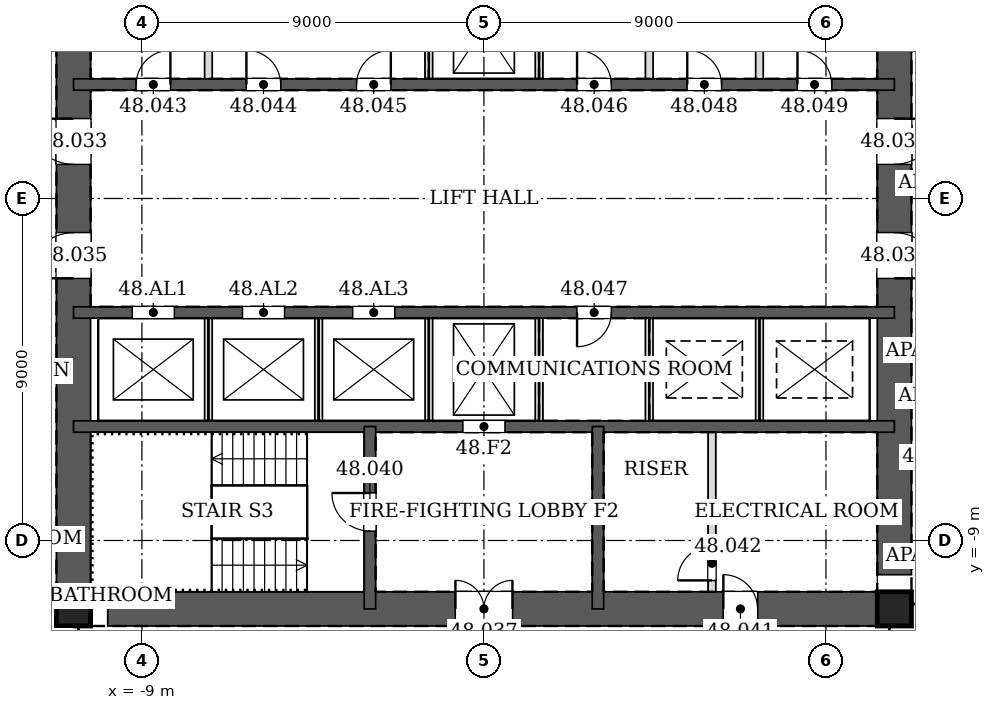
"""IFC4 building model, lengths in metres.
Left out: names, types, materials, properties, quantities, classifications, styles, units other than length and angle.
Written with IfcOpenShell. Run it as: python <this file> out.ifc"""

import sys

from ifc_helpers import new_model, si_unit, direction, frame, frame_2d, origin, origin_2d, place, context, subcontext, project, spatial, rectangle, hollow_rectangle, extrude, element, fill, save


model = new_model("IFC4")
c1 = context("Model", 3, precision=1e-05, world=origin(), true_north=direction((0.0, 1.0)))
c2 = subcontext(c1, "Body", "Model", "MODEL_VIEW")
j1 = project(units=[si_unit("LENGTHUNIT", "METRE"), si_unit("PLANEANGLEUNIT", "RADIAN")], contexts=[c1])
p1 = place(None, origin())
s1 = spatial("IfcSite", under=j1, at=p1, CompositionType="ELEMENT")
p2 = place(p1, origin())
s2 = spatial("IfcBuilding", under=s1, at=p2, CompositionType="ELEMENT")
p3 = place(p2, frame((0.0, 0.0, 210.8)))
s3 = spatial("IfcBuildingStorey", under=s2, at=p3, CompositionType="ELEMENT", Elevation=210.8)
for number, where, z_axis, x_axis in (
    (1, (-10.8, -10.8, 0.0), (0.0, 0.0, 1.0), (1.0, 0.0, 0.0)),
    (2, (10.8, -10.8, 0.0), (0.0, 0.0, 1.0), (1.0, 0.0, 0.0)),
):
    element("IfcColumn", number, at=place(p3, frame(where, z_axis=z_axis, x_axis=x_axis)), inside=s3, PredefinedType="COLUMN", context=c2, shape_type="SweptSolid", body=[
        extrude(hollow_rectangle(XDim=0.9, YDim=0.9, WallThickness=0.05, at=origin_2d()), origin(), (0.0, 0.0, 1.0), 3.4),
    ])
p4 = place(p3, frame((-10.8, -10.8, 0.0), z_axis=(0.0, 0.0, 1.0), x_axis=(1.0, 0.0, 0.0)))
e3 = element("IfcWall", 3, at=p4, inside=s3, PredefinedType="SOLIDWALL", context=c2, shape_type="SweptSolid", body=[
    extrude(rectangle(XDim=21.6, YDim=0.9, at=frame_2d((10.8, 0.0))), origin(), (0.0, 0.0, 1.0), 3.4),
])
p5 = place(p4, frame((10.05, 0.0, 0.0)))
e4 = element("IfcOpeningElement", 4, at=p5, cuts=e3, PredefinedType="OPENING", context=c2, shape_type="SweptSolid", body=[
    extrude(rectangle(XDim=1.5, YDim=2.1, at=frame_2d((0.75, 1.05))), frame((0.0, 0.46, 0.0), z_axis=(0.0, -1.0, 0.0), x_axis=(1.0, 0.0, 0.0)), (0.0, 0.0, 1.0), 0.92),
])
p6 = place(p4, frame((17.1, 0.0, 0.0)))
e5 = element("IfcOpeningElement", 5, at=p6, cuts=e3, PredefinedType="OPENING", context=c2, shape_type="SweptSolid", body=[
    extrude(rectangle(XDim=0.9, YDim=2.1, at=frame_2d((0.45, 1.05))), frame((0.0, 0.46, 0.0), z_axis=(0.0, -1.0, 0.0), x_axis=(1.0, 0.0, 0.0)), (0.0, 0.0, 1.0), 0.92),
])
p7 = place(p3, frame((10.8, -10.8, 0.0), z_axis=(0.0, 0.0, 1.0), x_axis=(0.0, 1.0, 0.0)))
e6 = element("IfcWall", 6, at=p7, inside=s3, PredefinedType="SOLIDWALL", context=c2, shape_type="SweptSolid", body=[
    extrude(rectangle(XDim=21.6, YDim=0.9, at=frame_2d((10.8, 0.0))), origin(), (0.0, 0.0, 1.0), 3.4),
])
p8 = place(p7, frame((11.7, 0.0, 0.0)))
e7 = element("IfcOpeningElement", 7, at=p8, cuts=e6, PredefinedType="OPENING", context=c2, shape_type="SweptSolid", body=[
    extrude(rectangle(XDim=1.2, YDim=2.1, at=frame_2d((0.6, 1.05))), frame((0.0, 0.46, 0.0), z_axis=(0.0, -1.0, 0.0), x_axis=(1.0, 0.0, 0.0)), (0.0, 0.0, 1.0), 0.92),
])
p9 = place(p7, frame((8.7, 0.0, 0.0)))
e8 = element("IfcOpeningElement", 8, at=p9, cuts=e6, PredefinedType="OPENING", context=c2, shape_type="SweptSolid", body=[
    extrude(rectangle(XDim=1.2, YDim=2.1, at=frame_2d((0.6, 1.05))), frame((0.0, 0.46, 0.0), z_axis=(0.0, -1.0, 0.0), x_axis=(1.0, 0.0, 0.0)), (0.0, 0.0, 1.0), 0.92),
])
p10 = place(p3, frame((-10.8, 10.8, 0.0), z_axis=(0.0, 0.0, 1.0), x_axis=(0.0, -1.0, 0.0)))
e9 = element("IfcWall", 9, at=p10, inside=s3, PredefinedType="SOLIDWALL", context=c2, shape_type="SweptSolid", body=[
    extrude(rectangle(XDim=21.6, YDim=0.9, at=frame_2d((10.8, 0.0))), origin(), (0.0, 0.0, 1.0), 3.4),
])
p11 = place(p10, frame((8.7, 0.0, 0.0)))
e10 = element("IfcOpeningElement", 10, at=p11, cuts=e9, PredefinedType="OPENING", context=c2, shape_type="SweptSolid", body=[
    extrude(rectangle(XDim=1.2, YDim=2.1, at=frame_2d((0.6, 1.05))), frame((0.0, 0.46, 0.0), z_axis=(0.0, -1.0, 0.0), x_axis=(1.0, 0.0, 0.0)), (0.0, 0.0, 1.0), 0.92),
])
p12 = place(p10, frame((11.7, 0.0, 0.0)))
e11 = element("IfcOpeningElement", 11, at=p12, cuts=e9, PredefinedType="OPENING", context=c2, shape_type="SweptSolid", body=[
    extrude(rectangle(XDim=1.2, YDim=2.1, at=frame_2d((0.6, 1.05))), frame((0.0, 0.46, 0.0), z_axis=(0.0, -1.0, 0.0), x_axis=(1.0, 0.0, 0.0)), (0.0, 0.0, 1.0), 0.92),
])
p13 = place(p3, frame((-10.8, 3.0, 0.0), z_axis=(0.0, 0.0, 1.0), x_axis=(1.0, 0.0, 0.0)))
e12 = element("IfcWall", 12, at=p13, inside=s3, PredefinedType="SOLIDWALL", context=c2, shape_type="SweptSolid", body=[
    extrude(rectangle(XDim=21.6, YDim=0.3, at=frame_2d((10.8, 0.0))), origin(), (0.0, 0.0, 1.0), 3.4),
])
p14 = place(p13, frame((1.65, 0.0, 0.0)))
e13 = element("IfcOpeningElement", 13, at=p14, cuts=e12, PredefinedType="OPENING", context=c2, shape_type="SweptSolid", body=[
    extrude(rectangle(XDim=0.9, YDim=2.1, at=frame_2d((0.45, 1.05))), frame((0.0, 0.16, 0.0), z_axis=(0.0, -1.0, 0.0), x_axis=(1.0, 0.0, 0.0)), (0.0, 0.0, 1.0), 0.32),
])
p15 = place(p13, frame((4.55, 0.0, 0.0)))
e14 = element("IfcOpeningElement", 14, at=p15, cuts=e12, PredefinedType="OPENING", context=c2, shape_type="SweptSolid", body=[
    extrude(rectangle(XDim=0.9, YDim=2.1, at=frame_2d((0.45, 1.05))), frame((0.0, 0.16, 0.0), z_axis=(0.0, -1.0, 0.0), x_axis=(1.0, 0.0, 0.0)), (0.0, 0.0, 1.0), 0.32),
])
p16 = place(p13, frame((7.45, 0.0, 0.0)))
e15 = element("IfcOpeningElement", 15, at=p16, cuts=e12, PredefinedType="OPENING", context=c2, shape_type="SweptSolid", body=[
    extrude(rectangle(XDim=0.9, YDim=2.1, at=frame_2d((0.45, 1.05))), frame((0.0, 0.16, 0.0), z_axis=(0.0, -1.0, 0.0), x_axis=(1.0, 0.0, 0.0)), (0.0, 0.0, 1.0), 0.32),
])
p17 = place(p13, frame((13.25, 0.0, 0.0)))
e16 = element("IfcOpeningElement", 16, at=p17, cuts=e12, PredefinedType="OPENING", context=c2, shape_type="SweptSolid", body=[
    extrude(rectangle(XDim=0.9, YDim=2.1, at=frame_2d((0.45, 1.05))), frame((0.0, 0.16, 0.0), z_axis=(0.0, -1.0, 0.0), x_axis=(1.0, 0.0, 0.0)), (0.0, 0.0, 1.0), 0.32),
])
p18 = place(p13, frame((16.15, 0.0, 0.0)))
e17 = element("IfcOpeningElement", 17, at=p18, cuts=e12, PredefinedType="OPENING", context=c2, shape_type="SweptSolid", body=[
    extrude(rectangle(XDim=0.9, YDim=2.1, at=frame_2d((0.45, 1.05))), frame((0.0, 0.16, 0.0), z_axis=(0.0, -1.0, 0.0), x_axis=(1.0, 0.0, 0.0)), (0.0, 0.0, 1.0), 0.32),
])
p19 = place(p13, frame((19.05, 0.0, 0.0)))
e18 = element("IfcOpeningElement", 18, at=p19, cuts=e12, PredefinedType="OPENING", context=c2, shape_type="SweptSolid", body=[
    extrude(rectangle(XDim=0.9, YDim=2.1, at=frame_2d((0.45, 1.05))), frame((0.0, 0.16, 0.0), z_axis=(0.0, -1.0, 0.0), x_axis=(1.0, 0.0, 0.0)), (0.0, 0.0, 1.0), 0.32),
])
p20 = place(p3, frame((-10.8, -3.0, 0.0), z_axis=(0.0, 0.0, 1.0), x_axis=(1.0, 0.0, 0.0)))
e19 = element("IfcWall", 19, at=p20, inside=s3, PredefinedType="SOLIDWALL", context=c2, shape_type="SweptSolid", body=[
    extrude(rectangle(XDim=21.6, YDim=0.3, at=frame_2d((10.8, 0.0))), origin(), (0.0, 0.0, 1.0), 3.4),
])
p21 = place(p20, frame((13.25, 0.0, 0.0)))
e20 = element("IfcOpeningElement", 20, at=p21, cuts=e19, PredefinedType="OPENING", context=c2, shape_type="SweptSolid", body=[
    extrude(rectangle(XDim=0.9, YDim=2.1, at=frame_2d((0.45, 1.05))), frame((0.0, 0.16, 0.0), z_axis=(0.0, -1.0, 0.0), x_axis=(1.0, 0.0, 0.0)), (0.0, 0.0, 1.0), 0.32),
])
p22 = place(p20, frame((1.55, 0.0, 0.0)))
e21 = element("IfcOpeningElement", 21, at=p22, cuts=e19, PredefinedType="OPENING", context=c2, shape_type="SweptSolid", body=[
    extrude(rectangle(XDim=1.1, YDim=2.1, at=frame_2d((0.55, 1.05))), frame((0.0, 0.16, 0.0), z_axis=(0.0, -1.0, 0.0), x_axis=(1.0, 0.0, 0.0)), (0.0, 0.0, 1.0), 0.32),
])
p23 = place(p20, frame((4.45, 0.0, 0.0)))
e22 = element("IfcOpeningElement", 22, at=p23, cuts=e19, PredefinedType="OPENING", context=c2, shape_type="SweptSolid", body=[
    extrude(rectangle(XDim=1.1, YDim=2.1, at=frame_2d((0.55, 1.05))), frame((0.0, 0.16, 0.0), z_axis=(0.0, -1.0, 0.0), x_axis=(1.0, 0.0, 0.0)), (0.0, 0.0, 1.0), 0.32),
])
p24 = place(p20, frame((7.35, 0.0, 0.0)))
e23 = element("IfcOpeningElement", 23, at=p24, cuts=e19, PredefinedType="OPENING", context=c2, shape_type="SweptSolid", body=[
    extrude(rectangle(XDim=1.1, YDim=2.1, at=frame_2d((0.55, 1.05))), frame((0.0, 0.16, 0.0), z_axis=(0.0, -1.0, 0.0), x_axis=(1.0, 0.0, 0.0)), (0.0, 0.0, 1.0), 0.32),
])
p25 = place(p3, frame((-10.8, -6.0, 0.0), z_axis=(0.0, 0.0, 1.0), x_axis=(1.0, 0.0, 0.0)))
e24 = element("IfcWall", 24, at=p25, inside=s3, PredefinedType="SOLIDWALL", context=c2, shape_type="SweptSolid", body=[
    extrude(rectangle(XDim=21.6, YDim=0.3, at=frame_2d((10.8, 0.0))), origin(), (0.0, 0.0, 1.0), 3.4),
])
p26 = place(p25, frame((10.25, 0.0, 0.0)))
e25 = element("IfcOpeningElement", 25, at=p26, cuts=e24, PredefinedType="OPENING", context=c2, shape_type="SweptSolid", body=[
    extrude(rectangle(XDim=1.1, YDim=2.1, at=frame_2d((0.55, 1.05))), frame((0.0, 0.16, 0.0), z_axis=(0.0, -1.0, 0.0), x_axis=(1.0, 0.0, 0.0)), (0.0, 0.0, 1.0), 0.32),
])
p27 = place(p3, frame((-3.0, -6.0, 0.0), z_axis=(0.0, 0.0, 1.0), x_axis=(0.0, -1.0, 0.0)))
e26 = element("IfcWall", 26, at=p27, inside=s3, PredefinedType="SOLIDWALL", context=c2, shape_type="SweptSolid", body=[
    extrude(rectangle(XDim=4.8, YDim=0.3, at=frame_2d((2.4, 0.0))), origin(), (0.0, 0.0, 1.0), 3.4),
])
p28 = place(p27, frame((1.75, 0.0, 0.0)))
e27 = element("IfcOpeningElement", 27, at=p28, cuts=e26, PredefinedType="OPENING", context=c2, shape_type="SweptSolid", body=[
    extrude(rectangle(XDim=1.0, YDim=2.1, at=frame_2d((0.5, 1.05))), frame((0.0, 0.16, 0.0), z_axis=(0.0, -1.0, 0.0), x_axis=(1.0, 0.0, 0.0)), (0.0, 0.0, 1.0), 0.32),
])
p29 = place(p3, frame((3.0, -6.0, 0.0), z_axis=(0.0, 0.0, 1.0), x_axis=(0.0, -1.0, 0.0)))
e28 = element("IfcWall", 28, at=p29, inside=s3, PredefinedType="SOLIDWALL", context=c2, shape_type="SweptSolid", body=[
    extrude(rectangle(XDim=4.8, YDim=0.3, at=frame_2d((2.4, 0.0))), origin(), (0.0, 0.0, 1.0), 3.4),
])
for number, where, z_axis, x_axis in (
    (29, (-7.25, 3.15, 0.0), (0.0, 0.0, 1.0), (0.0, 1.0, 0.0)),
    (30, (-1.45, 3.15, 0.0), (0.0, 0.0, 1.0), (0.0, 1.0, 0.0)),
    (31, (1.45, 3.15, 0.0), (0.0, 0.0, 1.0), (0.0, 1.0, 0.0)),
    (32, (4.35, 3.15, 0.0), (0.0, 0.0, 1.0), (0.0, 1.0, 0.0)),
    (33, (7.25, 3.15, 0.0), (0.0, 0.0, 1.0), (0.0, 1.0, 0.0)),
):
    element("IfcWall", number, at=place(p3, frame(where, z_axis=z_axis, x_axis=x_axis)), inside=s3, PredefinedType="PARTITIONING", context=c2, shape_type="SweptSolid", body=[
        extrude(rectangle(XDim=2.7, YDim=0.2, at=frame_2d((1.35, 0.0))), origin(), (0.0, 0.0, 1.0), 3.2),
    ])
for number, where, z_axis, x_axis in (
    (34, (-7.25, -5.85, 0.0), (0.0, 0.0, 1.0), (0.0, 1.0, 0.0)),
    (35, (-4.35, -5.85, 0.0), (0.0, 0.0, 1.0), (0.0, 1.0, 0.0)),
    (36, (-1.45, -5.85, 0.0), (0.0, 0.0, 1.0), (0.0, 1.0, 0.0)),
):
    element("IfcWall", number, at=place(p3, frame(where, z_axis=z_axis, x_axis=x_axis)), inside=s3, PredefinedType="PARTITIONING", context=c2, shape_type="SweptSolid", body=[
        extrude(rectangle(XDim=2.7, YDim=0.2, at=frame_2d((1.35, 0.0))), origin(), (0.0, 0.0, 1.0), 3.4),
    ])
for number, where, z_axis, x_axis in (
    (37, (1.45, -5.85, 0.0), (0.0, 0.0, 1.0), (0.0, 1.0, 0.0)),
    (38, (4.35, -5.85, 0.0), (0.0, 0.0, 1.0), (0.0, 1.0, 0.0)),
):
    element("IfcWall", number, at=place(p3, frame(where, z_axis=z_axis, x_axis=x_axis)), inside=s3, PredefinedType="PARTITIONING", context=c2, shape_type="SweptSolid", body=[
        extrude(rectangle(XDim=2.7, YDim=0.2, at=frame_2d((1.35, 0.0))), origin(), (0.0, 0.0, 1.0), 3.2),
    ])
p30 = place(p3, frame((7.25, -5.85, 0.0), z_axis=(0.0, 0.0, 1.0), x_axis=(0.0, 1.0, 0.0)))
e39 = element("IfcWall", 39, at=p30, inside=s3, PredefinedType="PARTITIONING", context=c2, shape_type="SweptSolid", body=[
    extrude(rectangle(XDim=2.7, YDim=0.2, at=frame_2d((1.35, 0.0))), origin(), (0.0, 0.0, 1.0), 3.4),
])
p31 = place(p3, frame((6.0, -10.35, 0.0), z_axis=(0.0, 0.0, 1.0), x_axis=(0.0, 1.0, 0.0)))
e40 = element("IfcWall", 40, at=p31, inside=s3, PredefinedType="PARTITIONING", context=c2, shape_type="SweptSolid", body=[
    extrude(rectangle(XDim=4.2, YDim=0.2, at=frame_2d((2.1, 0.0))), origin(), (0.0, 0.0, 1.0), 3.2),
])
p32 = place(p31, frame((0.3, 0.0, 0.0)))
e41 = element("IfcOpeningElement", 41, at=p32, cuts=e40, PredefinedType="OPENING", context=c2, shape_type="SweptSolid", body=[
    extrude(rectangle(XDim=0.9, YDim=2.1, at=frame_2d((0.45, 1.05))), frame((0.0, 0.11, 0.0), z_axis=(0.0, -1.0, 0.0), x_axis=(1.0, 0.0, 0.0)), (0.0, 0.0, 1.0), 0.22),
])
p33 = place(p8, frame((1.2, 0.0, 0.0), z_axis=(0.0, 0.0, 1.0), x_axis=(-1.0, 0.0, 0.0)))
e42 = element("IfcDoor", 42, at=p33, inside=s3, OperationType="SINGLE_SWING_LEFT", PredefinedType="DOOR", context=c2, shape_type="SweptSolid", body=[
    extrude(rectangle(XDim=1.2, YDim=2.1, at=frame_2d((0.6, 1.05))), frame((0.0, 0.025, 0.0), z_axis=(0.0, -1.0, 0.0), x_axis=(1.0, 0.0, 0.0)), (0.0, 0.0, 1.0), 0.05),
])
fill(e7, e42)
p34 = place(p11, frame((1.2, 0.0, 0.0), z_axis=(0.0, 0.0, 1.0), x_axis=(-1.0, 0.0, 0.0)))
e43 = element("IfcDoor", 43, at=p34, inside=s3, OperationType="SINGLE_SWING_RIGHT", PredefinedType="DOOR", context=c2, shape_type="SweptSolid", body=[
    extrude(rectangle(XDim=1.2, YDim=2.1, at=frame_2d((0.6, 1.05))), frame((0.0, 0.025, 0.0), z_axis=(0.0, -1.0, 0.0), x_axis=(1.0, 0.0, 0.0)), (0.0, 0.0, 1.0), 0.05),
])
fill(e10, e43)
p35 = place(p9, frame((1.2, 0.0, 0.0), z_axis=(0.0, 0.0, 1.0), x_axis=(-1.0, 0.0, 0.0)))
e44 = element("IfcDoor", 44, at=p35, inside=s3, OperationType="SINGLE_SWING_RIGHT", PredefinedType="DOOR", context=c2, shape_type="SweptSolid", body=[
    extrude(rectangle(XDim=1.2, YDim=2.1, at=frame_2d((0.6, 1.05))), frame((0.0, 0.025, 0.0), z_axis=(0.0, -1.0, 0.0), x_axis=(1.0, 0.0, 0.0)), (0.0, 0.0, 1.0), 0.05),
])
fill(e8, e44)
p36 = place(p12, frame((1.2, 0.0, 0.0), z_axis=(0.0, 0.0, 1.0), x_axis=(-1.0, 0.0, 0.0)))
e45 = element("IfcDoor", 45, at=p36, inside=s3, OperationType="SINGLE_SWING_LEFT", PredefinedType="DOOR", context=c2, shape_type="SweptSolid", body=[
    extrude(rectangle(XDim=1.2, YDim=2.1, at=frame_2d((0.6, 1.05))), frame((0.0, 0.025, 0.0), z_axis=(0.0, -1.0, 0.0), x_axis=(1.0, 0.0, 0.0)), (0.0, 0.0, 1.0), 0.05),
])
fill(e11, e45)
p37 = place(p5, origin())
e46 = element("IfcDoor", 46, at=p37, inside=s3, OperationType="DOUBLE_DOOR_SINGLE_SWING", PredefinedType="DOOR", context=c2, shape_type="SweptSolid", body=[
    extrude(rectangle(XDim=1.5, YDim=2.1, at=frame_2d((0.75, 1.05))), frame((0.0, 0.025, 0.0), z_axis=(0.0, -1.0, 0.0), x_axis=(1.0, 0.0, 0.0)), (0.0, 0.0, 1.0), 0.05),
])
fill(e4, e46)
p38 = place(p28, frame((1.0, 0.0, 0.0), z_axis=(0.0, 0.0, 1.0), x_axis=(-1.0, 0.0, 0.0)))
e47 = element("IfcDoor", 47, at=p38, inside=s3, OperationType="SINGLE_SWING_RIGHT", PredefinedType="DOOR", context=c2, shape_type="SweptSolid", body=[
    extrude(rectangle(XDim=1.0, YDim=2.1, at=frame_2d((0.5, 1.05))), frame((0.0, 0.025, 0.0), z_axis=(0.0, -1.0, 0.0), x_axis=(1.0, 0.0, 0.0)), (0.0, 0.0, 1.0), 0.05),
])
fill(e27, e47)
p39 = place(p6, origin())
e48 = element("IfcDoor", 48, at=p39, inside=s3, OperationType="SINGLE_SWING_LEFT", PredefinedType="DOOR", context=c2, shape_type="SweptSolid", body=[
    extrude(rectangle(XDim=0.9, YDim=2.1, at=frame_2d((0.45, 1.05))), frame((0.0, 0.025, 0.0), z_axis=(0.0, -1.0, 0.0), x_axis=(1.0, 0.0, 0.0)), (0.0, 0.0, 1.0), 0.05),
])
fill(e5, e48)
p40 = place(p32, origin())
e49 = element("IfcDoor", 49, at=p40, inside=s3, OperationType="SINGLE_SWING_LEFT", PredefinedType="DOOR", context=c2, shape_type="SweptSolid", body=[
    extrude(rectangle(XDim=0.9, YDim=2.1, at=frame_2d((0.45, 1.05))), frame((0.0, 0.025, 0.0), z_axis=(0.0, -1.0, 0.0), x_axis=(1.0, 0.0, 0.0)), (0.0, 0.0, 1.0), 0.05),
])
fill(e41, e49)
p41 = place(p14, origin())
e50 = element("IfcDoor", 50, at=p41, inside=s3, OperationType="SINGLE_SWING_RIGHT", PredefinedType="DOOR", context=c2, shape_type="SweptSolid", body=[
    extrude(rectangle(XDim=0.9, YDim=2.1, at=frame_2d((0.45, 1.05))), frame((0.0, 0.025, 0.0), z_axis=(0.0, -1.0, 0.0), x_axis=(1.0, 0.0, 0.0)), (0.0, 0.0, 1.0), 0.05),
])
fill(e13, e50)
p42 = place(p15, origin())
e51 = element("IfcDoor", 51, at=p42, inside=s3, OperationType="SINGLE_SWING_LEFT", PredefinedType="DOOR", context=c2, shape_type="SweptSolid", body=[
    extrude(rectangle(XDim=0.9, YDim=2.1, at=frame_2d((0.45, 1.05))), frame((0.0, 0.025, 0.0), z_axis=(0.0, -1.0, 0.0), x_axis=(1.0, 0.0, 0.0)), (0.0, 0.0, 1.0), 0.05),
])
fill(e14, e51)
p43 = place(p16, origin())
e52 = element("IfcDoor", 52, at=p43, inside=s3, OperationType="SINGLE_SWING_RIGHT", PredefinedType="DOOR", context=c2, shape_type="SweptSolid", body=[
    extrude(rectangle(XDim=0.9, YDim=2.1, at=frame_2d((0.45, 1.05))), frame((0.0, 0.025, 0.0), z_axis=(0.0, -1.0, 0.0), x_axis=(1.0, 0.0, 0.0)), (0.0, 0.0, 1.0), 0.05),
])
fill(e15, e52)
p44 = place(p17, origin())
e53 = element("IfcDoor", 53, at=p44, inside=s3, OperationType="SINGLE_SWING_LEFT", PredefinedType="DOOR", context=c2, shape_type="SweptSolid", body=[
    extrude(rectangle(XDim=0.9, YDim=2.1, at=frame_2d((0.45, 1.05))), frame((0.0, 0.025, 0.0), z_axis=(0.0, -1.0, 0.0), x_axis=(1.0, 0.0, 0.0)), (0.0, 0.0, 1.0), 0.05),
])
fill(e16, e53)
p45 = place(p21, frame((0.9, 0.0, 0.0), z_axis=(0.0, 0.0, 1.0), x_axis=(-1.0, 0.0, 0.0)))
e54 = element("IfcDoor", 54, at=p45, inside=s3, OperationType="SINGLE_SWING_RIGHT", PredefinedType="DOOR", context=c2, shape_type="SweptSolid", body=[
    extrude(rectangle(XDim=0.9, YDim=2.1, at=frame_2d((0.45, 1.05))), frame((0.0, 0.025, 0.0), z_axis=(0.0, -1.0, 0.0), x_axis=(1.0, 0.0, 0.0)), (0.0, 0.0, 1.0), 0.05),
])
fill(e20, e54)
p46 = place(p18, origin())
e55 = element("IfcDoor", 55, at=p46, inside=s3, OperationType="SINGLE_SWING_LEFT", PredefinedType="DOOR", context=c2, shape_type="SweptSolid", body=[
    extrude(rectangle(XDim=0.9, YDim=2.1, at=frame_2d((0.45, 1.05))), frame((0.0, 0.025, 0.0), z_axis=(0.0, -1.0, 0.0), x_axis=(1.0, 0.0, 0.0)), (0.0, 0.0, 1.0), 0.05),
])
fill(e17, e55)
p47 = place(p19, origin())
e56 = element("IfcDoor", 56, at=p47, inside=s3, OperationType="SINGLE_SWING_LEFT", PredefinedType="DOOR", context=c2, shape_type="SweptSolid", body=[
    extrude(rectangle(XDim=0.9, YDim=2.1, at=frame_2d((0.45, 1.05))), frame((0.0, 0.025, 0.0), z_axis=(0.0, -1.0, 0.0), x_axis=(1.0, 0.0, 0.0)), (0.0, 0.0, 1.0), 0.05),
])
fill(e18, e56)
p48 = place(p26, origin())
e57 = element("IfcDoor", 57, at=p48, inside=s3, OperationType="DOUBLE_DOOR_SLIDING", PredefinedType="DOOR", context=c2, shape_type="SweptSolid", body=[
    extrude(rectangle(XDim=1.1, YDim=2.1, at=frame_2d((0.55, 1.05))), frame((0.0, 0.025, 0.0), z_axis=(0.0, -1.0, 0.0), x_axis=(1.0, 0.0, 0.0)), (0.0, 0.0, 1.0), 0.05),
])
fill(e25, e57)
p49 = place(p22, origin())
e58 = element("IfcDoor", 58, at=p49, inside=s3, OperationType="DOUBLE_DOOR_SLIDING", PredefinedType="DOOR", context=c2, shape_type="SweptSolid", body=[
    extrude(rectangle(XDim=1.1, YDim=2.1, at=frame_2d((0.55, 1.05))), frame((0.0, 0.025, 0.0), z_axis=(0.0, -1.0, 0.0), x_axis=(1.0, 0.0, 0.0)), (0.0, 0.0, 1.0), 0.05),
])
fill(e21, e58)
p50 = place(p23, origin())
e59 = element("IfcDoor", 59, at=p50, inside=s3, OperationType="DOUBLE_DOOR_SLIDING", PredefinedType="DOOR", context=c2, shape_type="SweptSolid", body=[
    extrude(rectangle(XDim=1.1, YDim=2.1, at=frame_2d((0.55, 1.05))), frame((0.0, 0.025, 0.0), z_axis=(0.0, -1.0, 0.0), x_axis=(1.0, 0.0, 0.0)), (0.0, 0.0, 1.0), 0.05),
])
fill(e22, e59)
p51 = place(p24, origin())
e60 = element("IfcDoor", 60, at=p51, inside=s3, OperationType="DOUBLE_DOOR_SLIDING", PredefinedType="DOOR", context=c2, shape_type="SweptSolid", body=[
    extrude(rectangle(XDim=1.1, YDim=2.1, at=frame_2d((0.55, 1.05))), frame((0.0, 0.025, 0.0), z_axis=(0.0, -1.0, 0.0), x_axis=(1.0, 0.0, 0.0)), (0.0, 0.0, 1.0), 0.05),
])
fill(e23, e60)
save(model, sys.argv[1])
